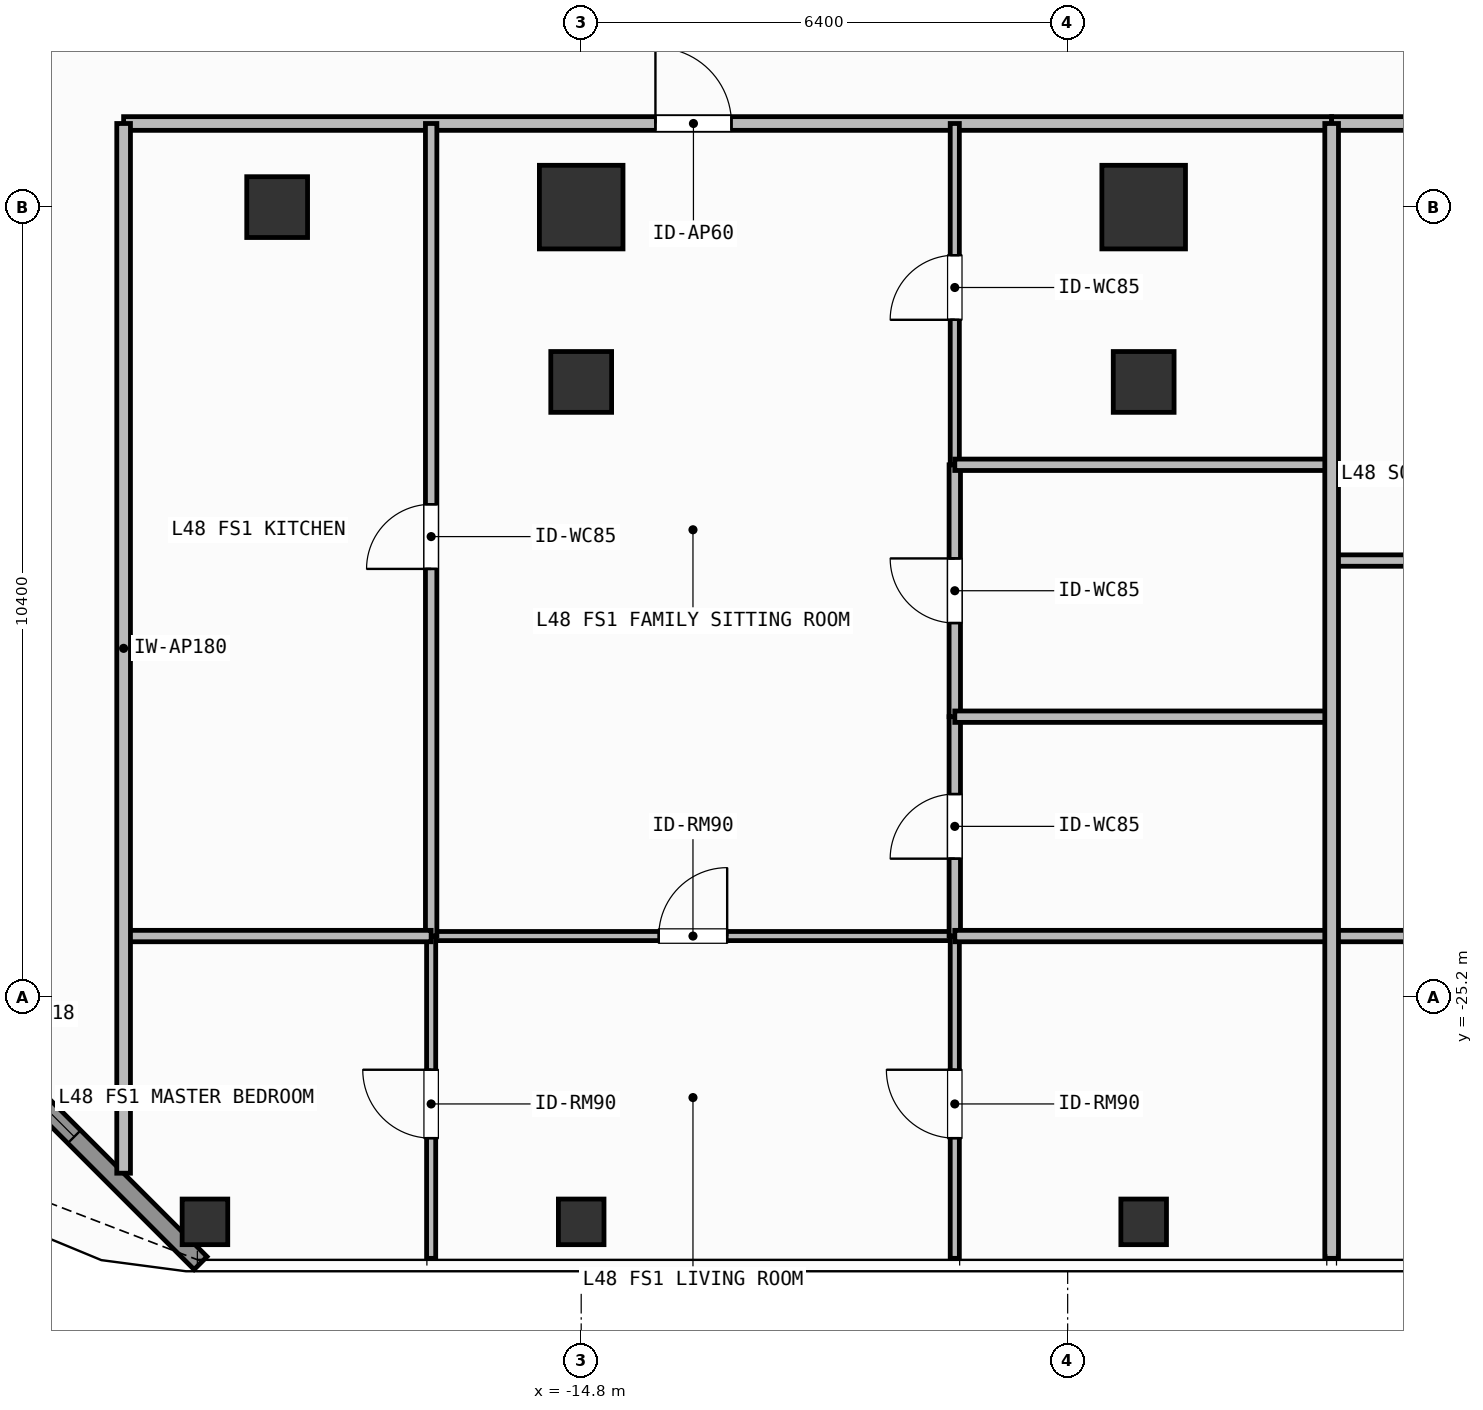
"""IFC4 building model, lengths in metres.
Left out: names, types, materials, properties, quantities, classifications, styles, units other than length and angle.
Written with IfcOpenShell. Run it as: python <this file> out.ifc"""

import sys

from ifc_helpers import new_model, si_unit, direction, frame, frame_2d, origin, origin_2d, place, context, subcontext, project, spatial, rectangle, hollow_rectangle, extrude, element, fill, save


model = new_model("IFC4")
c1 = context("Model", 3, precision=1e-05, world=origin(), true_north=direction((0.0, 1.0)))
c2 = subcontext(c1, "Body", "Model", "MODEL_VIEW")
j1 = project(units=[si_unit("LENGTHUNIT", "METRE"), si_unit("PLANEANGLEUNIT", "RADIAN")], contexts=[c1])
p1 = place(None, origin())
s1 = spatial("IfcSite", under=j1, at=p1, CompositionType="ELEMENT")
p2 = place(p1, origin())
s2 = spatial("IfcBuilding", under=s1, at=p2, CompositionType="ELEMENT")
p3 = place(p2, frame((0.0, 0.0, 195.3)))
s3 = spatial("IfcBuildingStorey", under=s2, at=p3, CompositionType="ELEMENT", Elevation=195.3)
for number, where, z_axis, x_axis in (
    (1, (-14.8, -14.8, 0.0), (0.0, 0.0, 1.0), (1.0, 0.0, 0.0)),
    (2, (-7.4, -14.8, 0.0), (0.0, 0.0, 1.0), (1.0, 0.0, 0.0)),
):
    element("IfcColumn", number, at=place(p3, frame(where, z_axis=z_axis, x_axis=x_axis)), inside=s3, PredefinedType="COLUMN", context=c2, shape_type="SweptSolid", body=[
        extrude(rectangle(XDim=1.1, YDim=1.1, at=origin_2d()), origin(), (0.0, 0.0, 1.0), 3.9),
    ])
for number, where, z_axis, x_axis in (
    (3, (-18.8, -14.8, 0.0), (0.0, 0.0, 1.0), (1.0, 0.0, 0.0)),
    (4, (-14.8, -17.1, 0.0), (0.0, 0.0, 1.0), (1.0, 0.0, 0.0)),
    (5, (-7.4, -17.1, 0.0), (0.0, 0.0, 1.0), (1.0, 0.0, 0.0)),
):
    element("IfcColumn", number, at=place(p3, frame(where, z_axis=z_axis, x_axis=x_axis)), inside=s3, PredefinedType="COLUMN", context=c2, shape_type="SweptSolid", body=[
        extrude(hollow_rectangle(XDim=0.8, YDim=0.8, WallThickness=0.036, at=origin_2d()), origin(), (0.0, 0.0, 1.0), 3.9),
    ])
for number, where, z_axis, x_axis in (
    (6, (-19.75, -28.15, 0.0), (0.0, 0.0, 1.0), (1.0, 0.0, 0.0)),
    (7, (-14.8, -28.15, 0.0), (0.0, 0.0, 1.0), (1.0, 0.0, 0.0)),
    (8, (-7.4, -28.15, 0.0), (0.0, 0.0, 1.0), (1.0, 0.0, 0.0)),
):
    element("IfcColumn", number, at=place(p3, frame(where, z_axis=z_axis, x_axis=x_axis)), inside=s3, PredefinedType="COLUMN", context=c2, shape_type="SweptSolid", body=[
        extrude(hollow_rectangle(XDim=0.6, YDim=0.6, WallThickness=0.028, at=origin_2d()), origin(), (0.0, 0.0, 1.0), 3.9),
    ])
p4 = place(p3, frame((-19.808, -28.692, 0.0), z_axis=(0.0, 0.0, 1.0), x_axis=(-0.707106781187, 0.707106781187, 0.0)))
e9 = element("IfcWall", 9, at=p4, inside=s3, PredefinedType="SOLIDWALL", context=c2, shape_type="SweptSolid", body=[
    extrude(rectangle(XDim=6.201, YDim=0.24, at=frame_2d((3.101, 0.0))), origin(), (0.0, 0.0, 1.0), 3.68),
])
p5 = place(p4, frame((2.351, 0.0, 0.8)))
e10 = element("IfcOpeningElement", 10, at=p5, cuts=e9, PredefinedType="OPENING", context=c2, shape_type="SweptSolid", body=[
    extrude(rectangle(XDim=1.5, YDim=1.85, at=frame_2d((0.75, 0.925))), frame((0.0, 0.13, 0.0), z_axis=(0.0, -1.0, 0.0), x_axis=(1.0, 0.0, 0.0)), (0.0, 0.0, 1.0), 0.26),
])
p6 = place(p3, frame((-20.82, -13.7, 0.0), z_axis=(0.0, 0.0, 1.0), x_axis=(1.0, 0.0, 0.0)))
e11 = element("IfcWall", 11, at=p6, inside=s3, PredefinedType="PARTITIONING", context=c2, shape_type="SweptSolid", body=[
    extrude(rectangle(XDim=15.893, YDim=0.18, at=frame_2d((7.947, 0.0))), origin(), (0.0, 0.0, 1.0), 3.68),
])
p7 = place(p6, frame((6.997, 0.0, 0.0)))
e12 = element("IfcOpeningElement", 12, at=p7, cuts=e11, PredefinedType="OPENING", context=c2, shape_type="SweptSolid", body=[
    extrude(rectangle(XDim=1.0, YDim=2.2, at=frame_2d((0.5, 1.1))), frame((0.0, 0.1, 0.0), z_axis=(0.0, -1.0, 0.0), x_axis=(1.0, 0.0, 0.0)), (0.0, 0.0, 1.0), 0.2),
])
p8 = place(p3, frame((-16.774, -24.39, 0.0), z_axis=(0.0, 0.0, 1.0), x_axis=(1.0, 0.0, 0.0)))
e13 = element("IfcWall", 13, at=p8, inside=s3, PredefinedType="PARTITIONING", context=c2, shape_type="SweptSolid", body=[
    extrude(rectangle(XDim=6.889, YDim=0.12, at=frame_2d((3.444, 0.0))), origin(), (0.0, 0.0, 1.0), 3.68),
])
p9 = place(p8, frame((2.994, 0.0, 0.0)))
e14 = element("IfcOpeningElement", 14, at=p9, cuts=e13, PredefinedType="OPENING", context=c2, shape_type="SweptSolid", body=[
    extrude(rectangle(XDim=0.9, YDim=2.1, at=frame_2d((0.45, 1.05))), frame((0.0, 0.07, 0.0), z_axis=(0.0, -1.0, 0.0), x_axis=(1.0, 0.0, 0.0)), (0.0, 0.0, 1.0), 0.14),
])
p10 = place(p3, frame((-16.774, -24.39, 0.0), z_axis=(0.0, 0.0, 1.0), x_axis=(0.0, 1.0, 0.0)))
e15 = element("IfcWall", 15, at=p10, inside=s3, PredefinedType="PARTITIONING", context=c2, shape_type="SweptSolid", body=[
    extrude(rectangle(XDim=10.69, YDim=0.15, at=frame_2d((5.345, 0.0))), origin(), (0.0, 0.0, 1.0), 3.68),
])
p11 = place(p10, frame((4.83, 0.0, 0.0)))
e16 = element("IfcOpeningElement", 16, at=p11, cuts=e15, PredefinedType="OPENING", context=c2, shape_type="SweptSolid", body=[
    extrude(rectangle(XDim=0.85, YDim=2.1, at=frame_2d((0.425, 1.05))), frame((0.0, 0.085, 0.0), z_axis=(0.0, -1.0, 0.0), x_axis=(1.0, 0.0, 0.0)), (0.0, 0.0, 1.0), 0.17),
])
p12 = place(p3, frame((-16.774, -28.63, 0.0), z_axis=(0.0, 0.0, 1.0), x_axis=(0.0, 1.0, 0.0)))
e17 = element("IfcWall", 17, at=p12, inside=s3, PredefinedType="PARTITIONING", context=c2, shape_type="SweptSolid", body=[
    extrude(rectangle(XDim=4.24, YDim=0.12, at=frame_2d((2.12, 0.0))), origin(), (0.0, 0.0, 1.0), 3.68),
])
p13 = place(p12, frame((1.581, 0.0, 0.0)))
e18 = element("IfcOpeningElement", 18, at=p13, cuts=e17, PredefinedType="OPENING", context=c2, shape_type="SweptSolid", body=[
    extrude(rectangle(XDim=0.9, YDim=2.1, at=frame_2d((0.45, 1.05))), frame((0.0, 0.07, 0.0), z_axis=(0.0, -1.0, 0.0), x_axis=(1.0, 0.0, 0.0)), (0.0, 0.0, 1.0), 0.14),
])
p14 = place(p3, frame((-9.885, -24.39, 0.0), z_axis=(0.0, 0.0, 1.0), x_axis=(0.0, 1.0, 0.0)))
e19 = element("IfcWall", 19, at=p14, inside=s3, PredefinedType="PARTITIONING", context=c2, shape_type="SweptSolid", body=[
    extrude(rectangle(XDim=2.886, YDim=0.15, at=frame_2d((1.443, 0.0))), origin(), (0.0, 0.0, 1.0), 3.68),
])
p15 = place(p14, frame((1.018, 0.0, 0.0)))
e20 = element("IfcOpeningElement", 20, at=p15, cuts=e19, PredefinedType="OPENING", context=c2, shape_type="SweptSolid", body=[
    extrude(rectangle(XDim=0.85, YDim=2.1, at=frame_2d((0.425, 1.05))), frame((0.0, 0.085, 0.0), z_axis=(0.0, -1.0, 0.0), x_axis=(1.0, 0.0, 0.0)), (0.0, 0.0, 1.0), 0.17),
])
p16 = place(p3, frame((-9.885, -21.504, 0.0), z_axis=(0.0, 0.0, 1.0), x_axis=(0.0, 1.0, 0.0)))
e21 = element("IfcWall", 21, at=p16, inside=s3, PredefinedType="PARTITIONING", context=c2, shape_type="SweptSolid", body=[
    extrude(rectangle(XDim=3.314, YDim=0.15, at=frame_2d((1.657, 0.0))), origin(), (0.0, 0.0, 1.0), 3.68),
])
p17 = place(p16, frame((1.232, 0.0, 0.0)))
e22 = element("IfcOpeningElement", 22, at=p17, cuts=e21, PredefinedType="OPENING", context=c2, shape_type="SweptSolid", body=[
    extrude(rectangle(XDim=0.85, YDim=2.1, at=frame_2d((0.425, 1.05))), frame((0.0, 0.085, 0.0), z_axis=(0.0, -1.0, 0.0), x_axis=(1.0, 0.0, 0.0)), (0.0, 0.0, 1.0), 0.17),
])
p18 = place(p3, frame((-9.885, -18.19, 0.0), z_axis=(0.0, 0.0, 1.0), x_axis=(0.0, 1.0, 0.0)))
e23 = element("IfcWall", 23, at=p18, inside=s3, PredefinedType="PARTITIONING", context=c2, shape_type="SweptSolid", body=[
    extrude(rectangle(XDim=4.49, YDim=0.12, at=frame_2d((2.245, 0.0))), origin(), (0.0, 0.0, 1.0), 3.68),
])
p19 = place(p18, frame((1.907, 0.0, 0.0)))
e24 = element("IfcOpeningElement", 24, at=p19, cuts=e23, PredefinedType="OPENING", context=c2, shape_type="SweptSolid", body=[
    extrude(rectangle(XDim=0.85, YDim=2.1, at=frame_2d((0.425, 1.05))), frame((0.0, 0.07, 0.0), z_axis=(0.0, -1.0, 0.0), x_axis=(1.0, 0.0, 0.0)), (0.0, 0.0, 1.0), 0.14),
])
p20 = place(p3, frame((-9.885, -28.63, 0.0), z_axis=(0.0, 0.0, 1.0), x_axis=(0.0, 1.0, 0.0)))
e25 = element("IfcWall", 25, at=p20, inside=s3, PredefinedType="PARTITIONING", context=c2, shape_type="SweptSolid", body=[
    extrude(rectangle(XDim=4.24, YDim=0.12, at=frame_2d((2.12, 0.0))), origin(), (0.0, 0.0, 1.0), 3.68),
])
p21 = place(p20, frame((1.581, 0.0, 0.0)))
e26 = element("IfcOpeningElement", 26, at=p21, cuts=e25, PredefinedType="OPENING", context=c2, shape_type="SweptSolid", body=[
    extrude(rectangle(XDim=0.9, YDim=2.1, at=frame_2d((0.45, 1.05))), frame((0.0, 0.07, 0.0), z_axis=(0.0, -1.0, 0.0), x_axis=(1.0, 0.0, 0.0)), (0.0, 0.0, 1.0), 0.14),
])
p22 = place(p3, frame((-4.927, -13.7, 0.0), z_axis=(0.0, 0.0, 1.0), x_axis=(1.0, 0.0, 0.0)))
e27 = element("IfcWall", 27, at=p22, inside=s3, PredefinedType="PARTITIONING", context=c2, shape_type="SweptSolid", body=[
    extrude(rectangle(XDim=21.947, YDim=0.18, at=frame_2d((10.974, 0.0))), origin(), (0.0, 0.0, 1.0), 3.68),
])
p23 = place(p22, frame((10.563, 0.0, 0.0)))
e28 = element("IfcOpeningElement", 28, at=p23, cuts=e27, PredefinedType="OPENING", context=c2, shape_type="SweptSolid", body=[
    extrude(rectangle(XDim=1.0, YDim=2.2, at=frame_2d((0.5, 1.1))), frame((0.0, 0.1, 0.0), z_axis=(0.0, -1.0, 0.0), x_axis=(1.0, 0.0, 0.0)), (0.0, 0.0, 1.0), 0.2),
])
p24 = place(p3, frame((-20.82, -24.39, 0.0), z_axis=(0.0, 0.0, 1.0), x_axis=(1.0, 0.0, 0.0)))
e29 = element("IfcWall", 29, at=p24, inside=s3, PredefinedType="PARTITIONING", context=c2, shape_type="SweptSolid", body=[
    extrude(rectangle(XDim=4.046, YDim=0.15, at=frame_2d((2.023, 0.0))), origin(), (0.0, 0.0, 1.0), 3.68),
])
for number, where, z_axis, x_axis in (
    (30, (-9.885, -21.504, 0.0), (0.0, 0.0, 1.0), (1.0, 0.0, 0.0)),
    (31, (-9.885, -18.19, 0.0), (0.0, 0.0, 1.0), (1.0, 0.0, 0.0)),
    (32, (-9.885, -24.39, 0.0), (0.0, 0.0, 1.0), (1.0, 0.0, 0.0)),
):
    element("IfcWall", number, at=place(p3, frame(where, z_axis=z_axis, x_axis=x_axis)), inside=s3, PredefinedType="PARTITIONING", context=c2, shape_type="SweptSolid", body=[
        extrude(rectangle(XDim=4.958, YDim=0.15, at=frame_2d((2.479, 0.0))), origin(), (0.0, 0.0, 1.0), 3.68),
    ])
for number, where, z_axis, x_axis in (
    (33, (-4.927, -19.45, 0.0), (0.0, 0.0, 1.0), (1.0, 0.0, 0.0)),
    (34, (-4.927, -24.39, 0.0), (0.0, 0.0, 1.0), (1.0, 0.0, 0.0)),
):
    element("IfcWall", number, at=place(p3, frame(where, z_axis=z_axis, x_axis=x_axis)), inside=s3, PredefinedType="PARTITIONING", context=c2, shape_type="SweptSolid", body=[
        extrude(rectangle(XDim=6.882, YDim=0.15, at=frame_2d((3.441, 0.0))), origin(), (0.0, 0.0, 1.0), 3.68),
    ])
p25 = place(p3, frame((-4.927, -28.63, 0.0), z_axis=(0.0, 0.0, 1.0), x_axis=(0.0, 1.0, 0.0)))
e35 = element("IfcWall", 35, at=p25, inside=s3, PredefinedType="PARTITIONING", context=c2, shape_type="SweptSolid", body=[
    extrude(rectangle(XDim=14.93, YDim=0.18, at=frame_2d((7.465, 0.0))), origin(), (0.0, 0.0, 1.0), 3.68),
])
p26 = place(p3, frame((-20.82, -27.51, 0.0), z_axis=(0.0, 0.0, 1.0), x_axis=(0.0, 1.0, 0.0)))
e36 = element("IfcWall", 36, at=p26, inside=s3, PredefinedType="PARTITIONING", context=c2, shape_type="SweptSolid", body=[
    extrude(rectangle(XDim=13.81, YDim=0.18, at=frame_2d((6.905, 0.0))), origin(), (0.0, 0.0, 1.0), 3.68),
])
p27 = place(p5, origin())
e37 = element("IfcWindow", 37, at=p27, inside=s3, PartitioningType="SINGLE_PANEL", PredefinedType="WINDOW", context=c2, shape_type="SweptSolid", body=[
    extrude(rectangle(XDim=1.5, YDim=1.85, at=frame_2d((0.75, 0.925))), frame((0.0, 0.03, 0.0), z_axis=(0.0, -1.0, 0.0), x_axis=(1.0, 0.0, 0.0)), (0.0, 0.0, 1.0), 0.06),
])
fill(e10, e37)
p28 = place(p7, origin())
e38 = element("IfcDoor", 38, at=p28, inside=s3, OperationType="SINGLE_SWING_LEFT", PredefinedType="DOOR", context=c2, shape_type="SweptSolid", body=[
    extrude(rectangle(XDim=1.0, YDim=2.2, at=frame_2d((0.5, 1.1))), frame((0.0, 0.025, 0.0), z_axis=(0.0, -1.0, 0.0), x_axis=(1.0, 0.0, 0.0)), (0.0, 0.0, 1.0), 0.05),
])
fill(e12, e38)
p29 = place(p9, origin())
e39 = element("IfcDoor", 39, at=p29, inside=s3, OperationType="SINGLE_SWING_RIGHT", PredefinedType="DOOR", context=c2, shape_type="SweptSolid", body=[
    extrude(rectangle(XDim=0.9, YDim=2.1, at=frame_2d((0.45, 1.05))), frame((0.0, 0.025, 0.0), z_axis=(0.0, -1.0, 0.0), x_axis=(1.0, 0.0, 0.0)), (0.0, 0.0, 1.0), 0.05),
])
fill(e14, e39)
p30 = place(p11, origin())
e40 = element("IfcDoor", 40, at=p30, inside=s3, OperationType="SINGLE_SWING_LEFT", PredefinedType="DOOR", context=c2, shape_type="SweptSolid", body=[
    extrude(rectangle(XDim=0.85, YDim=2.1, at=frame_2d((0.425, 1.05))), frame((0.0, 0.025, 0.0), z_axis=(0.0, -1.0, 0.0), x_axis=(1.0, 0.0, 0.0)), (0.0, 0.0, 1.0), 0.05),
])
fill(e16, e40)
p31 = place(p13, origin())
e41 = element("IfcDoor", 41, at=p31, inside=s3, OperationType="SINGLE_SWING_RIGHT", PredefinedType="DOOR", context=c2, shape_type="SweptSolid", body=[
    extrude(rectangle(XDim=0.9, YDim=2.1, at=frame_2d((0.45, 1.05))), frame((0.0, 0.025, 0.0), z_axis=(0.0, -1.0, 0.0), x_axis=(1.0, 0.0, 0.0)), (0.0, 0.0, 1.0), 0.05),
])
fill(e18, e41)
p32 = place(p15, origin())
e42 = element("IfcDoor", 42, at=p32, inside=s3, OperationType="SINGLE_SWING_LEFT", PredefinedType="DOOR", context=c2, shape_type="SweptSolid", body=[
    extrude(rectangle(XDim=0.85, YDim=2.1, at=frame_2d((0.425, 1.05))), frame((0.0, 0.025, 0.0), z_axis=(0.0, -1.0, 0.0), x_axis=(1.0, 0.0, 0.0)), (0.0, 0.0, 1.0), 0.05),
])
fill(e20, e42)
p33 = place(p17, origin())
e43 = element("IfcDoor", 43, at=p33, inside=s3, OperationType="SINGLE_SWING_RIGHT", PredefinedType="DOOR", context=c2, shape_type="SweptSolid", body=[
    extrude(rectangle(XDim=0.85, YDim=2.1, at=frame_2d((0.425, 1.05))), frame((0.0, 0.025, 0.0), z_axis=(0.0, -1.0, 0.0), x_axis=(1.0, 0.0, 0.0)), (0.0, 0.0, 1.0), 0.05),
])
fill(e22, e43)
p34 = place(p19, origin())
e44 = element("IfcDoor", 44, at=p34, inside=s3, OperationType="SINGLE_SWING_LEFT", PredefinedType="DOOR", context=c2, shape_type="SweptSolid", body=[
    extrude(rectangle(XDim=0.85, YDim=2.1, at=frame_2d((0.425, 1.05))), frame((0.0, 0.025, 0.0), z_axis=(0.0, -1.0, 0.0), x_axis=(1.0, 0.0, 0.0)), (0.0, 0.0, 1.0), 0.05),
])
fill(e24, e44)
p35 = place(p21, origin())
e45 = element("IfcDoor", 45, at=p35, inside=s3, OperationType="SINGLE_SWING_RIGHT", PredefinedType="DOOR", context=c2, shape_type="SweptSolid", body=[
    extrude(rectangle(XDim=0.9, YDim=2.1, at=frame_2d((0.45, 1.05))), frame((0.0, 0.025, 0.0), z_axis=(0.0, -1.0, 0.0), x_axis=(1.0, 0.0, 0.0)), (0.0, 0.0, 1.0), 0.05),
])
fill(e26, e45)
save(model, sys.argv[1])
